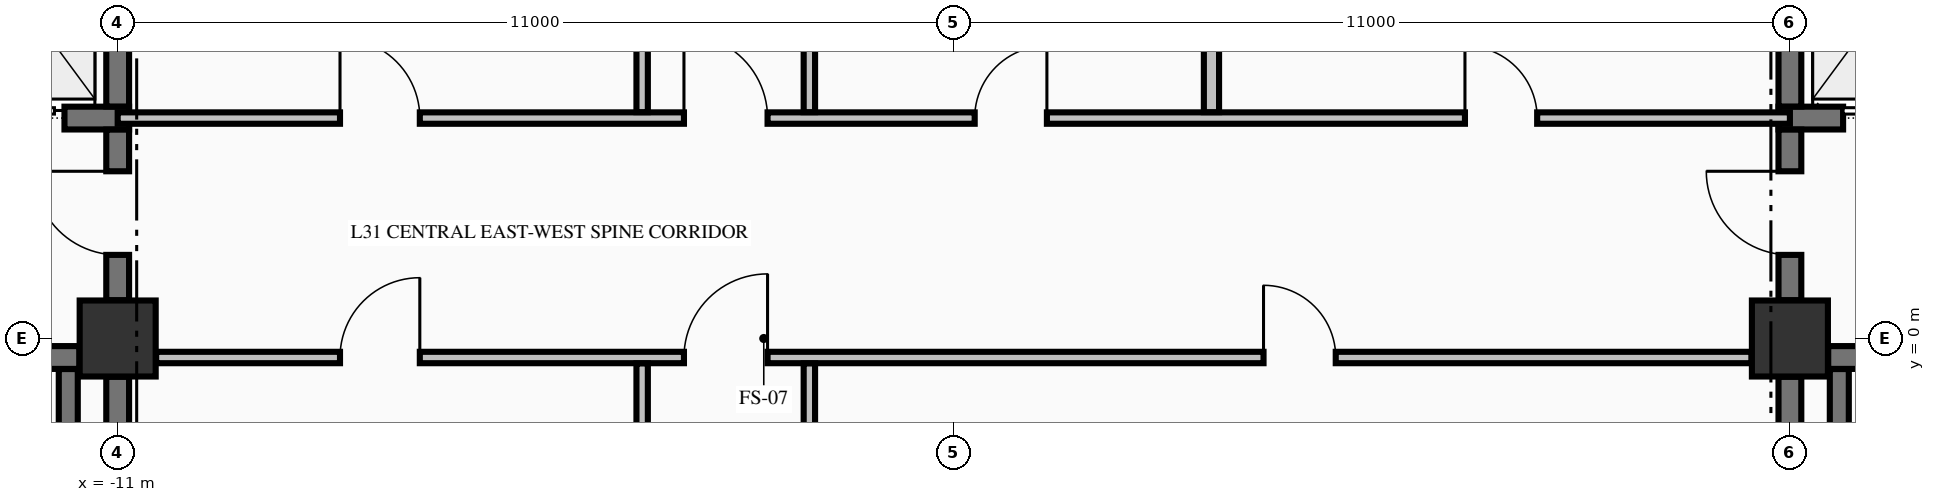
"""IFC4 building model, lengths in metres.
Left out: names, types, materials, properties, quantities, classifications, styles, units other than length and angle.
Written with IfcOpenShell. Run it as: python <this file> out.ifc"""

import sys

from ifc_helpers import new_model, si_unit, direction, frame, frame_2d, origin, origin_2d, place, context, subcontext, project, spatial, rectangle, extrude, element, fill, save


model = new_model("IFC4")
c1 = context("Model", 3, precision=1e-05, world=origin(), true_north=direction((0.0, 1.0)))
c2 = subcontext(c1, "Body", "Model", "MODEL_VIEW")
j1 = project(units=[si_unit("LENGTHUNIT", "METRE"), si_unit("PLANEANGLEUNIT", "RADIAN")], contexts=[c1])
p1 = place(None, origin())
s1 = spatial("IfcSite", under=j1, at=p1, CompositionType="ELEMENT")
p2 = place(p1, origin())
s2 = spatial("IfcBuilding", under=s1, at=p2, CompositionType="ELEMENT")
p3 = place(p2, frame((0.0, 0.0, 124.92)))
s3 = spatial("IfcBuildingStorey", under=s2, at=p3, CompositionType="ELEMENT", Elevation=124.92)
for number, where, z_axis, x_axis in (
    (1, (-11.0, 0.0, -0.25), (0.0, 0.0, 1.0), (1.0, 0.0, 0.0)),
    (2, (11.0, 0.0, -0.25), (0.0, 0.0, 1.0), (1.0, 0.0, 0.0)),
):
    element("IfcColumn", number, at=place(p3, frame(where, z_axis=z_axis, x_axis=x_axis)), inside=s3, PredefinedType="COLUMN", context=c2, shape_type="SweptSolid", body=[
        extrude(rectangle(XDim=1.0, YDim=1.0, at=origin_2d()), origin(), (0.0, 0.0, 1.0), 3.57),
    ])
p4 = place(p3, frame((-19.496, -0.25, 0.0), z_axis=(0.0, 0.0, 1.0), x_axis=(1.0, 0.0, 0.0)))
e3 = element("IfcWall", 3, at=p4, inside=s3, PredefinedType="SHEAR", context=c2, shape_type="SweptSolid", body=[
    extrude(rectangle(XDim=7.992, YDim=0.3, at=frame_2d((3.996, 0.0))), origin(), (0.0, 0.0, 1.0), 3.32),
])
p5 = place(p4, frame((5.796, 0.0, 0.0)))
e4 = element("IfcOpeningElement", 4, at=p5, cuts=e3, PredefinedType="OPENING", context=c2, shape_type="SweptSolid", body=[
    extrude(rectangle(XDim=1.1, YDim=2.15, at=frame_2d((0.55, 1.075))), frame((0.0, 0.16, 0.0), z_axis=(0.0, -1.0, 0.0), x_axis=(1.0, 0.0, 0.0)), (0.0, 0.0, 1.0), 0.32),
])
p6 = place(p3, frame((11.504, -0.25, 0.0), z_axis=(0.0, 0.0, 1.0), x_axis=(1.0, 0.0, 0.0)))
e5 = element("IfcWall", 5, at=p6, inside=s3, PredefinedType="SHEAR", context=c2, shape_type="SweptSolid", body=[
    extrude(rectangle(XDim=3.371, YDim=0.3, at=frame_2d((1.686, 0.0))), origin(), (0.0, 0.0, 1.0), 3.32),
])
p7 = place(p6, frame((1.096, 0.0, 0.0)))
e6 = element("IfcOpeningElement", 6, at=p7, cuts=e5, PredefinedType="OPENING", context=c2, shape_type="SweptSolid", body=[
    extrude(rectangle(XDim=1.1, YDim=2.15, at=frame_2d((0.55, 1.075))), frame((0.0, 0.16, 0.0), z_axis=(0.0, -1.0, 0.0), x_axis=(1.0, 0.0, 0.0)), (0.0, 0.0, 1.0), 0.32),
])
p8 = place(p3, frame((-14.875, 2.9, 0.0), z_axis=(0.0, 0.0, 1.0), x_axis=(1.0, 0.0, 0.0)))
e7 = element("IfcWall", 7, at=p8, inside=s3, PredefinedType="SHEAR", context=c2, shape_type="SweptSolid", body=[
    extrude(rectangle(XDim=4.025, YDim=0.3, at=frame_2d((2.012, 0.0))), origin(), (0.0, 0.0, 1.0), 3.32),
])
p9 = place(p8, frame((2.075, 0.0, 0.0)))
e8 = element("IfcOpeningElement", 8, at=p9, cuts=e7, PredefinedType="OPENING", context=c2, shape_type="SweptSolid", body=[
    extrude(rectangle(XDim=1.1, YDim=2.2, at=frame_2d((0.55, 1.1))), frame((0.0, 0.16, 0.0), z_axis=(0.0, -1.0, 0.0), x_axis=(1.0, 0.0, 0.0)), (0.0, 0.0, 1.0), 0.32),
])
p10 = place(p3, frame((10.85, 2.9, 0.0), z_axis=(0.0, 0.0, 1.0), x_axis=(1.0, 0.0, 0.0)))
e9 = element("IfcWall", 9, at=p10, inside=s3, PredefinedType="SHEAR", context=c2, shape_type="SweptSolid", body=[
    extrude(rectangle(XDim=4.025, YDim=0.3, at=frame_2d((2.012, 0.0))), origin(), (0.0, 0.0, 1.0), 3.32),
])
p11 = place(p10, frame((0.85, 0.0, 0.0)))
e10 = element("IfcOpeningElement", 10, at=p11, cuts=e9, PredefinedType="OPENING", context=c2, shape_type="SweptSolid", body=[
    extrude(rectangle(XDim=1.1, YDim=2.2, at=frame_2d((0.55, 1.1))), frame((0.0, 0.16, 0.0), z_axis=(0.0, -1.0, 0.0), x_axis=(1.0, 0.0, 0.0)), (0.0, 0.0, 1.0), 0.32),
])
p12 = place(p3, frame((-10.494, -0.25, 0.0), z_axis=(0.0, 0.0, 1.0), x_axis=(1.0, 0.0, 0.0)))
e11 = element("IfcWall", 11, at=p12, inside=s3, PredefinedType="PARTITIONING", context=c2, shape_type="SweptSolid", body=[
    extrude(rectangle(XDim=20.988, YDim=0.15, at=frame_2d((10.494, 0.0))), origin(), (0.0, 0.0, 1.0), 3.32),
])
p13 = place(p12, frame((6.944, 0.0, 0.0)))
e12 = element("IfcOpeningElement", 12, at=p13, cuts=e11, PredefinedType="OPENING", context=c2, shape_type="SweptSolid", body=[
    extrude(rectangle(XDim=1.1, YDim=2.15, at=frame_2d((0.55, 1.075))), frame((0.0, 0.085, 0.0), z_axis=(0.0, -1.0, 0.0), x_axis=(1.0, 0.0, 0.0)), (0.0, 0.0, 1.0), 0.17),
])
p14 = place(p12, frame((2.419, 0.0, 0.0)))
e13 = element("IfcOpeningElement", 13, at=p14, cuts=e11, PredefinedType="OPENING", context=c2, shape_type="SweptSolid", body=[
    extrude(rectangle(XDim=1.05, YDim=2.15, at=frame_2d((0.525, 1.075))), frame((0.0, 0.085, 0.0), z_axis=(0.0, -1.0, 0.0), x_axis=(1.0, 0.0, 0.0)), (0.0, 0.0, 1.0), 0.17),
])
p15 = place(p12, frame((14.569, 0.0, 0.0)))
e14 = element("IfcOpeningElement", 14, at=p15, cuts=e11, PredefinedType="OPENING", context=c2, shape_type="SweptSolid", body=[
    extrude(rectangle(XDim=0.95, YDim=2.15, at=frame_2d((0.475, 1.075))), frame((0.0, 0.085, 0.0), z_axis=(0.0, -1.0, 0.0), x_axis=(1.0, 0.0, 0.0)), (0.0, 0.0, 1.0), 0.17),
])
p16 = place(p3, frame((-11.0, 2.9, 0.0), z_axis=(0.0, 0.0, 1.0), x_axis=(1.0, 0.0, 0.0)))
e15 = element("IfcWall", 15, at=p16, inside=s3, PredefinedType="PARTITIONING", context=c2, shape_type="SweptSolid", body=[
    extrude(rectangle(XDim=22.0, YDim=0.15, at=frame_2d((11.0, 0.0))), origin(), (0.0, 0.0, 1.0), 3.32),
])
p17 = place(p16, frame((7.45, 0.0, 0.0)))
e16 = element("IfcOpeningElement", 16, at=p17, cuts=e15, PredefinedType="OPENING", context=c2, shape_type="SweptSolid", body=[
    extrude(rectangle(XDim=1.1, YDim=2.15, at=frame_2d((0.55, 1.075))), frame((0.0, 0.085, 0.0), z_axis=(0.0, -1.0, 0.0), x_axis=(1.0, 0.0, 0.0)), (0.0, 0.0, 1.0), 0.17),
])
p18 = place(p16, frame((2.925, 0.0, 0.0)))
e17 = element("IfcOpeningElement", 17, at=p18, cuts=e15, PredefinedType="OPENING", context=c2, shape_type="SweptSolid", body=[
    extrude(rectangle(XDim=1.05, YDim=2.15, at=frame_2d((0.525, 1.075))), frame((0.0, 0.085, 0.0), z_axis=(0.0, -1.0, 0.0), x_axis=(1.0, 0.0, 0.0)), (0.0, 0.0, 1.0), 0.17),
])
p19 = place(p16, frame((11.275, 0.0, 0.0)))
e18 = element("IfcOpeningElement", 18, at=p19, cuts=e15, PredefinedType="OPENING", context=c2, shape_type="SweptSolid", body=[
    extrude(rectangle(XDim=0.95, YDim=2.15, at=frame_2d((0.475, 1.075))), frame((0.0, 0.085, 0.0), z_axis=(0.0, -1.0, 0.0), x_axis=(1.0, 0.0, 0.0)), (0.0, 0.0, 1.0), 0.17),
])
p20 = place(p16, frame((17.725, 0.0, 0.0)))
e19 = element("IfcOpeningElement", 19, at=p20, cuts=e15, PredefinedType="OPENING", context=c2, shape_type="SweptSolid", body=[
    extrude(rectangle(XDim=0.95, YDim=2.15, at=frame_2d((0.475, 1.075))), frame((0.0, 0.085, 0.0), z_axis=(0.0, -1.0, 0.0), x_axis=(1.0, 0.0, 0.0)), (0.0, 0.0, 1.0), 0.17),
])
p21 = place(p3, frame((-11.65, -9.798, 0.0), z_axis=(0.0, 0.0, 1.0), x_axis=(0.0, 1.0, 0.0)))
e20 = element("IfcWall", 20, at=p21, inside=s3, PredefinedType="SOLIDWALL", context=c2, shape_type="SweptSolid", body=[
    extrude(rectangle(XDim=9.396, YDim=0.25, at=frame_2d((4.698, 0.0))), origin(), (0.0, 0.0, 1.0), 3.32),
])
p22 = place(p3, frame((-11.0, -9.446, 0.0), z_axis=(0.0, 0.0, 1.0), x_axis=(0.0, 1.0, 0.0)))
e21 = element("IfcWall", 21, at=p22, inside=s3, PredefinedType="SHEAR", context=c2, shape_type="SweptSolid", body=[
    extrude(rectangle(XDim=8.942, YDim=0.3, at=frame_2d((4.471, 0.0))), origin(), (0.0, 0.0, 1.0), 3.32),
])
p23 = place(p3, frame((-11.0, 0.504, 0.0), z_axis=(0.0, 0.0, 1.0), x_axis=(0.0, 1.0, 0.0)))
e22 = element("IfcWall", 22, at=p23, inside=s3, PredefinedType="SHEAR", context=c2, shape_type="SweptSolid", body=[
    extrude(rectangle(XDim=2.244, YDim=0.3, at=frame_2d((1.122, 0.0))), origin(), (0.0, 0.0, 1.0), 3.32),
])
p24 = place(p23, frame((0.596, 0.0, 0.0)))
e23 = element("IfcOpeningElement", 23, at=p24, cuts=e22, PredefinedType="OPENING", context=c2, shape_type="SweptSolid", body=[
    extrude(rectangle(XDim=1.1, YDim=2.15, at=frame_2d((0.55, 1.075))), frame((0.0, 0.16, 0.0), z_axis=(0.0, -1.0, 0.0), x_axis=(1.0, 0.0, 0.0)), (0.0, 0.0, 1.0), 0.32),
])
p25 = place(p3, frame((-11.0, 3.052, 0.0), z_axis=(0.0, 0.0, 1.0), x_axis=(0.0, 1.0, 0.0)))
e24 = element("IfcWall", 24, at=p25, inside=s3, PredefinedType="SHEAR", context=c2, shape_type="SweptSolid", body=[
    extrude(rectangle(XDim=2.496, YDim=0.3, at=frame_2d((1.248, 0.0))), origin(), (0.0, 0.0, 1.0), 3.32),
])
p26 = place(p3, frame((11.0, -9.446, 0.0), z_axis=(0.0, 0.0, 1.0), x_axis=(0.0, 1.0, 0.0)))
e25 = element("IfcWall", 25, at=p26, inside=s3, PredefinedType="SHEAR", context=c2, shape_type="SweptSolid", body=[
    extrude(rectangle(XDim=8.942, YDim=0.3, at=frame_2d((4.471, 0.0))), origin(), (0.0, 0.0, 1.0), 3.32),
])
p27 = place(p3, frame((11.0, 0.504, 0.0), z_axis=(0.0, 0.0, 1.0), x_axis=(0.0, 1.0, 0.0)))
e26 = element("IfcWall", 26, at=p27, inside=s3, PredefinedType="SHEAR", context=c2, shape_type="SweptSolid", body=[
    extrude(rectangle(XDim=2.244, YDim=0.3, at=frame_2d((1.122, 0.0))), origin(), (0.0, 0.0, 1.0), 3.32),
])
p28 = place(p27, frame((0.596, 0.0, 0.0)))
e27 = element("IfcOpeningElement", 27, at=p28, cuts=e26, PredefinedType="OPENING", context=c2, shape_type="SweptSolid", body=[
    extrude(rectangle(XDim=1.1, YDim=2.15, at=frame_2d((0.55, 1.075))), frame((0.0, 0.16, 0.0), z_axis=(0.0, -1.0, 0.0), x_axis=(1.0, 0.0, 0.0)), (0.0, 0.0, 1.0), 0.32),
])
p29 = place(p3, frame((11.0, 3.052, 0.0), z_axis=(0.0, 0.0, 1.0), x_axis=(0.0, 1.0, 0.0)))
e28 = element("IfcWall", 28, at=p29, inside=s3, PredefinedType="SHEAR", context=c2, shape_type="SweptSolid", body=[
    extrude(rectangle(XDim=2.496, YDim=0.3, at=frame_2d((1.248, 0.0))), origin(), (0.0, 0.0, 1.0), 3.32),
])
p30 = place(p3, frame((11.65, -9.798, 0.0), z_axis=(0.0, 0.0, 1.0), x_axis=(0.0, 1.0, 0.0)))
e29 = element("IfcWall", 29, at=p30, inside=s3, PredefinedType="SOLIDWALL", context=c2, shape_type="SweptSolid", body=[
    extrude(rectangle(XDim=9.396, YDim=0.25, at=frame_2d((4.698, 0.0))), origin(), (0.0, 0.0, 1.0), 3.32),
])
p31 = place(p3, frame((-4.1, -9.872, 0.0), z_axis=(0.0, 0.0, 1.0), x_axis=(0.0, 1.0, 0.0)))
e30 = element("IfcWall", 30, at=p31, inside=s3, PredefinedType="PARTITIONING", context=c2, shape_type="SweptSolid", body=[
    extrude(rectangle(XDim=9.544, YDim=0.15, at=frame_2d((4.772, 0.0))), origin(), (0.0, 0.0, 1.0), 3.32),
])
p32 = place(p3, frame((-4.1, 2.978, 0.0), z_axis=(0.0, 0.0, 1.0), x_axis=(0.0, 1.0, 0.0)))
e31 = element("IfcWall", 31, at=p32, inside=s3, PredefinedType="PARTITIONING", context=c2, shape_type="SweptSolid", body=[
    extrude(rectangle(XDim=7.444, YDim=0.15, at=frame_2d((3.722, 0.0))), origin(), (0.0, 0.0, 1.0), 3.32),
])
p33 = place(p3, frame((-1.9, -4.747, 0.0), z_axis=(0.0, 0.0, 1.0), x_axis=(0.0, 1.0, 0.0)))
e32 = element("IfcWall", 32, at=p33, inside=s3, PredefinedType="PARTITIONING", context=c2, shape_type="SweptSolid", body=[
    extrude(rectangle(XDim=4.419, YDim=0.15, at=frame_2d((2.209, 0.0))), origin(), (0.0, 0.0, 1.0), 3.32),
])
p34 = place(p3, frame((-1.9, 2.978, 0.0), z_axis=(0.0, 0.0, 1.0), x_axis=(0.0, 1.0, 0.0)))
e33 = element("IfcWall", 33, at=p34, inside=s3, PredefinedType="PARTITIONING", context=c2, shape_type="SweptSolid", body=[
    extrude(rectangle(XDim=7.444, YDim=0.15, at=frame_2d((3.722, 0.0))), origin(), (0.0, 0.0, 1.0), 3.32),
])
p35 = place(p3, frame((3.39, 2.978, 0.0), z_axis=(0.0, 0.0, 1.0), x_axis=(0.0, 1.0, 0.0)))
e34 = element("IfcWall", 34, at=p35, inside=s3, PredefinedType="PARTITIONING", context=c2, shape_type="SweptSolid", body=[
    extrude(rectangle(XDim=7.444, YDim=0.2, at=frame_2d((3.722, 0.0))), origin(), (0.0, 0.0, 1.0), 3.32),
])
p36 = place(p24, origin())
e35 = element("IfcDoor", 35, at=p36, inside=s3, OperationType="SINGLE_SWING_RIGHT", PredefinedType="DOOR", context=c2, shape_type="SweptSolid", body=[
    extrude(rectangle(XDim=1.1, YDim=2.15, at=frame_2d((0.55, 1.075))), frame((0.0, 0.025, 0.0), z_axis=(0.0, -1.0, 0.0), x_axis=(1.0, 0.0, 0.0)), (0.0, 0.0, 1.0), 0.05),
])
fill(e23, e35)
p37 = place(p9, origin())
e36 = element("IfcDoor", 36, at=p37, inside=s3, OperationType="SLIDING_TO_LEFT", PredefinedType="DOOR", context=c2, shape_type="SweptSolid", body=[
    extrude(rectangle(XDim=1.1, YDim=2.2, at=frame_2d((0.55, 1.1))), frame((0.0, 0.025, 0.0), z_axis=(0.0, -1.0, 0.0), x_axis=(1.0, 0.0, 0.0)), (0.0, 0.0, 1.0), 0.05),
])
fill(e8, e36)
p38 = place(p28, origin())
e37 = element("IfcDoor", 37, at=p38, inside=s3, OperationType="SINGLE_SWING_RIGHT", PredefinedType="DOOR", context=c2, shape_type="SweptSolid", body=[
    extrude(rectangle(XDim=1.1, YDim=2.15, at=frame_2d((0.55, 1.075))), frame((0.0, 0.025, 0.0), z_axis=(0.0, -1.0, 0.0), x_axis=(1.0, 0.0, 0.0)), (0.0, 0.0, 1.0), 0.05),
])
fill(e27, e37)
p39 = place(p11, origin())
e38 = element("IfcDoor", 38, at=p39, inside=s3, OperationType="SLIDING_TO_RIGHT", PredefinedType="DOOR", context=c2, shape_type="SweptSolid", body=[
    extrude(rectangle(XDim=1.1, YDim=2.2, at=frame_2d((0.55, 1.1))), frame((0.0, 0.025, 0.0), z_axis=(0.0, -1.0, 0.0), x_axis=(1.0, 0.0, 0.0)), (0.0, 0.0, 1.0), 0.05),
])
fill(e10, e38)
p40 = place(p17, origin())
e39 = element("IfcDoor", 39, at=p40, inside=s3, OperationType="SINGLE_SWING_LEFT", PredefinedType="DOOR", context=c2, shape_type="SweptSolid", body=[
    extrude(rectangle(XDim=1.1, YDim=2.15, at=frame_2d((0.55, 1.075))), frame((0.0, 0.025, 0.0), z_axis=(0.0, -1.0, 0.0), x_axis=(1.0, 0.0, 0.0)), (0.0, 0.0, 1.0), 0.05),
])
fill(e16, e39)
p41 = place(p13, origin())
e40 = element("IfcDoor", 40, at=p41, inside=s3, OperationType="SINGLE_SWING_RIGHT", PredefinedType="DOOR", context=c2, shape_type="SweptSolid", body=[
    extrude(rectangle(XDim=1.1, YDim=2.15, at=frame_2d((0.55, 1.075))), frame((0.0, 0.025, 0.0), z_axis=(0.0, -1.0, 0.0), x_axis=(1.0, 0.0, 0.0)), (0.0, 0.0, 1.0), 0.05),
])
fill(e12, e40)
p42 = place(p18, origin())
e41 = element("IfcDoor", 41, at=p42, inside=s3, OperationType="SINGLE_SWING_LEFT", PredefinedType="DOOR", context=c2, shape_type="SweptSolid", body=[
    extrude(rectangle(XDim=1.05, YDim=2.15, at=frame_2d((0.525, 1.075))), frame((0.0, 0.025, 0.0), z_axis=(0.0, -1.0, 0.0), x_axis=(1.0, 0.0, 0.0)), (0.0, 0.0, 1.0), 0.05),
])
fill(e17, e41)
p43 = place(p19, origin())
e42 = element("IfcDoor", 42, at=p43, inside=s3, OperationType="SINGLE_SWING_RIGHT", PredefinedType="DOOR", context=c2, shape_type="SweptSolid", body=[
    extrude(rectangle(XDim=0.95, YDim=2.15, at=frame_2d((0.475, 1.075))), frame((0.0, 0.025, 0.0), z_axis=(0.0, -1.0, 0.0), x_axis=(1.0, 0.0, 0.0)), (0.0, 0.0, 1.0), 0.05),
])
fill(e18, e42)
p44 = place(p20, origin())
e43 = element("IfcDoor", 43, at=p44, inside=s3, OperationType="SINGLE_SWING_LEFT", PredefinedType="DOOR", context=c2, shape_type="SweptSolid", body=[
    extrude(rectangle(XDim=0.95, YDim=2.15, at=frame_2d((0.475, 1.075))), frame((0.0, 0.025, 0.0), z_axis=(0.0, -1.0, 0.0), x_axis=(1.0, 0.0, 0.0)), (0.0, 0.0, 1.0), 0.05),
])
fill(e19, e43)
p45 = place(p14, origin())
e44 = element("IfcDoor", 44, at=p45, inside=s3, OperationType="SINGLE_SWING_RIGHT", PredefinedType="DOOR", context=c2, shape_type="SweptSolid", body=[
    extrude(rectangle(XDim=1.05, YDim=2.15, at=frame_2d((0.525, 1.075))), frame((0.0, 0.025, 0.0), z_axis=(0.0, -1.0, 0.0), x_axis=(1.0, 0.0, 0.0)), (0.0, 0.0, 1.0), 0.05),
])
fill(e13, e44)
p46 = place(p15, origin())
e45 = element("IfcDoor", 45, at=p46, inside=s3, OperationType="SINGLE_SWING_LEFT", PredefinedType="DOOR", context=c2, shape_type="SweptSolid", body=[
    extrude(rectangle(XDim=0.95, YDim=2.15, at=frame_2d((0.475, 1.075))), frame((0.0, 0.025, 0.0), z_axis=(0.0, -1.0, 0.0), x_axis=(1.0, 0.0, 0.0)), (0.0, 0.0, 1.0), 0.05),
])
fill(e14, e45)
save(model, sys.argv[1])
